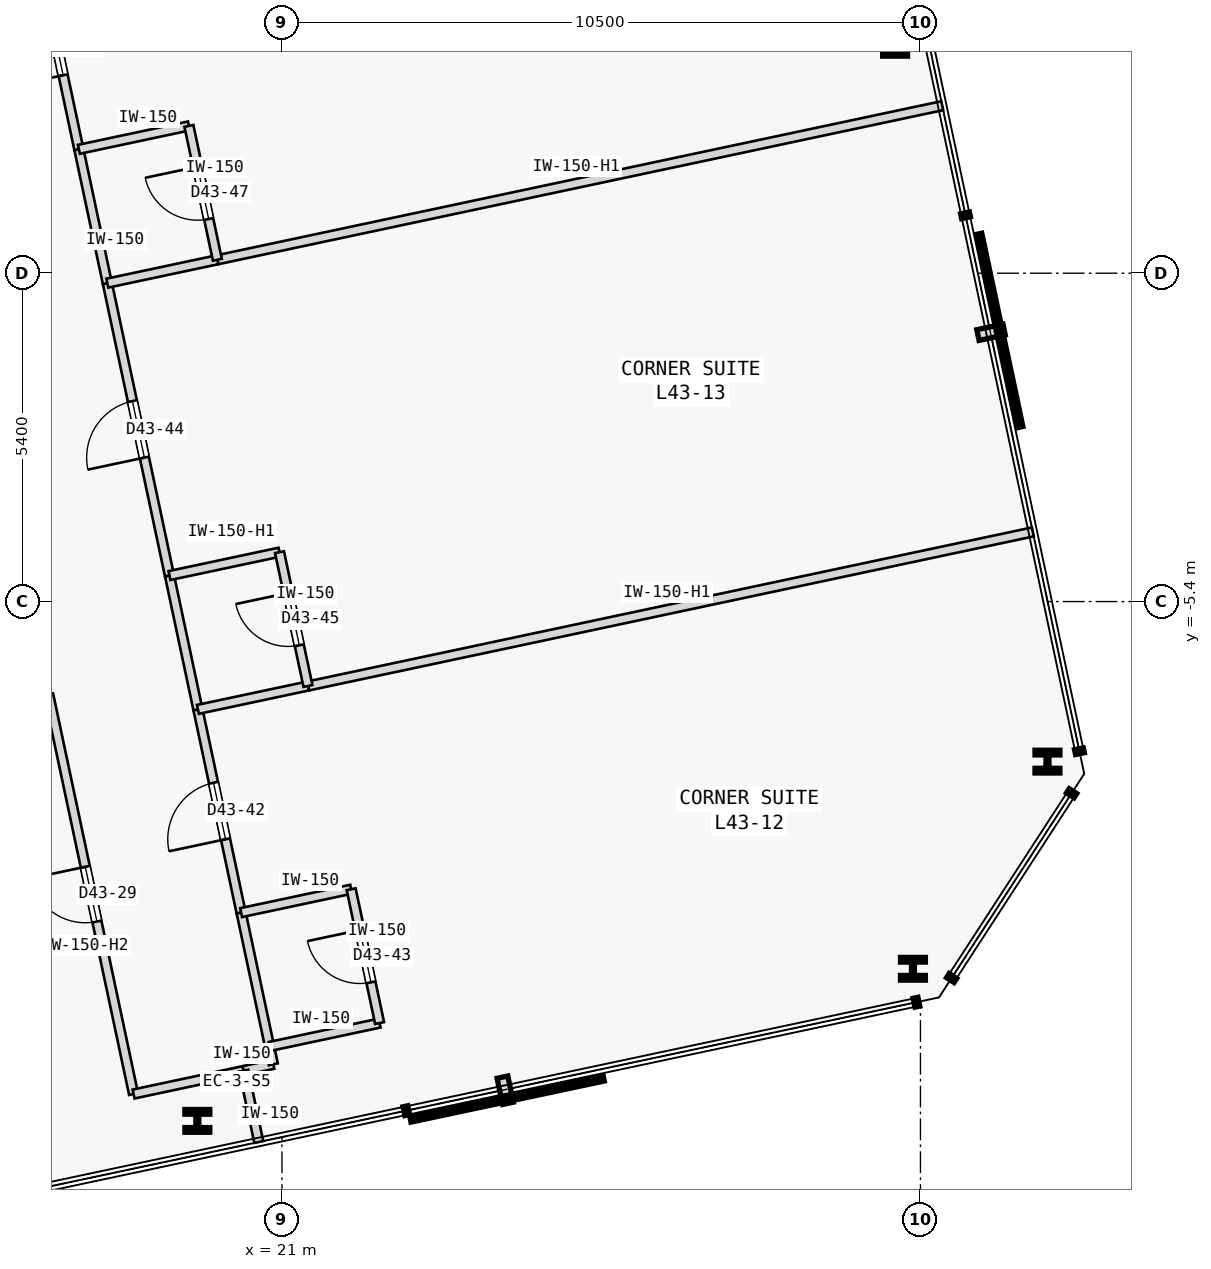
"""IFC4 building model, lengths in metres.
Left out: names, types, materials, properties, quantities, classifications, styles, units other than length and angle.
Written with IfcOpenShell. Run it as: python <this file> out.ifc"""

import sys

from ifc_helpers import new_model, si_unit, direction, frame, frame_2d, origin, origin_2d, place, context, subcontext, project, spatial, rectangle, i_section, extrude, element, fill, save


model = new_model("IFC4")
c1 = context("Model", 3, precision=1e-05, world=origin(), true_north=direction((0.0, 1.0)))
c2 = subcontext(c1, "Body", "Model", "MODEL_VIEW")
j1 = project(units=[si_unit("LENGTHUNIT", "METRE"), si_unit("PLANEANGLEUNIT", "RADIAN")], contexts=[c1])
p1 = place(None, origin())
s1 = spatial("IfcSite", under=j1, at=p1, CompositionType="ELEMENT")
p2 = place(p1, origin())
s2 = spatial("IfcBuilding", under=s1, at=p2, CompositionType="ELEMENT")
p3 = place(p2, frame((0.0, 0.0, 168.4)))
s3 = spatial("IfcBuildingStorey", under=s2, at=p3, CompositionType="ELEMENT", Elevation=168.4)
for number, where, z_axis, x_axis in (
    (1, (19.608, -13.94, 0.0), (0.0, 0.0, 1.0), (1.0, 0.0, 0.0)),
    (2, (31.376, -11.439, 0.0), (0.0, 0.0, 1.0), (1.0, 0.0, 0.0)),
    (3, (33.589, -8.032, 0.0), (0.0, 0.0, 1.0), (1.0, 0.0, 0.0)),
    (4, (31.083, 3.756, 0.0), (0.0, 0.0, 1.0), (1.0, 0.0, 0.0)),
):
    element("IfcColumn", number, at=place(p3, frame(where, z_axis=z_axis, x_axis=x_axis)), inside=s3, PredefinedType="COLUMN", context=c2, shape_type="SweptSolid", body=[
        extrude(i_section(OverallWidth=0.409, OverallDepth=0.374, WebThickness=0.048, FlangeThickness=0.077, FilletRadius=0.015, at=origin_2d()), origin(), (0.0, 0.0, 1.0), 3.4),
    ])
p4 = place(p3, frame((18.56, -13.498, 0.0), z_axis=(0.0, 0.0, 1.0), x_axis=(-0.207888737749, 0.978152479278, 0.0)))
e5 = element("IfcWall", 5, at=p4, inside=s3, PredefinedType="PARTITIONING", context=c2, shape_type="SweptSolid", body=[
    extrude(rectangle(XDim=6.72, YDim=0.15, at=frame_2d((3.36, 0.0))), origin(), (0.0, 0.0, 1.0), 2.575),
])
p5 = place(p4, frame((2.9, 0.0, 0.0)))
e6 = element("IfcOpeningElement", 6, at=p5, cuts=e5, PredefinedType="OPENING", context=c2, shape_type="SweptSolid", body=[
    extrude(rectangle(XDim=0.92, YDim=2.15, at=frame_2d((0.46, 1.075))), frame((0.0, 0.085, 0.0), z_axis=(0.0, -1.0, 0.0), x_axis=(1.0, 0.0, 0.0)), (0.0, 0.0, 1.0), 0.17),
])
p6 = place(p3, frame((18.56, -13.498, 0.0), z_axis=(0.0, 0.0, 1.0), x_axis=(0.978160192495, 0.207852442415, 0.0)))
e7 = element("IfcWall", 7, at=p6, inside=s3, PredefinedType="PARTITIONING", context=c2, shape_type="SweptSolid", body=[
    extrude(rectangle(XDim=1.85, YDim=0.15, at=frame_2d((0.925, 0.0))), origin(), (0.0, 0.0, 1.0), 3.175),
])
p7 = place(p3, frame((20.369, -13.114, 0.0), z_axis=(0.0, 0.0, 1.0), x_axis=(0.978143962546, 0.207928806409, 0.0)))
e8 = element("IfcWall", 8, at=p7, inside=s3, PredefinedType="PARTITIONING", context=c2, shape_type="SweptSolid", body=[
    extrude(rectangle(XDim=0.5, YDim=0.15, at=frame_2d((0.25, 0.0))), origin(), (0.0, 0.0, 1.0), 3.175),
])
p8 = place(p3, frame((20.858, -13.01, 0.0), z_axis=(0.0, 0.0, 1.0), x_axis=(-0.208306395052, 0.978063620518, 0.0)))
e9 = element("IfcWall", 9, at=p8, inside=s3, PredefinedType="PARTITIONING", context=c2, shape_type="SweptSolid", body=[
    extrude(rectangle(XDim=0.3, YDim=0.15, at=frame_2d((0.15, 0.0))), origin(), (0.0, 0.0, 1.0), 3.175),
])
p9 = place(p3, frame((20.328, -10.515, 0.0), z_axis=(0.0, 0.0, 1.0), x_axis=(-0.207918572776, 0.978146137903, 0.0)))
e10 = element("IfcWall", 10, at=p9, inside=s3, PredefinedType="PARTITIONING", context=c2, shape_type="SweptSolid", body=[
    extrude(rectangle(XDim=3.417, YDim=0.15, at=frame_2d((1.708, 0.0))), origin(), (0.0, 0.0, 1.0), 3.175),
])
p10 = place(p9, frame((1.233, 0.0, 0.0)))
e11 = element("IfcOpeningElement", 11, at=p10, cuts=e10, PredefinedType="OPENING", context=c2, shape_type="SweptSolid", body=[
    extrude(rectangle(XDim=0.95, YDim=2.15, at=frame_2d((0.475, 1.075))), frame((0.0, 0.085, 0.0), z_axis=(0.0, -1.0, 0.0), x_axis=(1.0, 0.0, 0.0)), (0.0, 0.0, 1.0), 0.17),
])
p11 = place(p3, frame((20.796, -12.716, 0.0), z_axis=(0.0, 0.0, 1.0), x_axis=(-0.207891197838, 0.978151956427, 0.0)))
e12 = element("IfcWall", 12, at=p11, inside=s3, PredefinedType="PARTITIONING", context=c2, shape_type="SweptSolid", body=[
    extrude(rectangle(XDim=2.25, YDim=0.15, at=frame_2d((1.125, 0.0))), origin(), (0.0, 0.0, 1.0), 3.175),
])
p12 = place(p3, frame((19.15, -4.972, 0.0), z_axis=(0.0, 0.0, 1.0), x_axis=(-0.207934781332, 0.978142692409, 0.0)))
e13 = element("IfcWall", 13, at=p12, inside=s3, PredefinedType="PARTITIONING", context=c2, shape_type="SweptSolid", body=[
    extrude(rectangle(XDim=4.916, YDim=0.15, at=frame_2d((2.458, 0.0))), origin(), (0.0, 0.0, 1.0), 3.175),
])
p13 = place(p12, frame((1.983, 0.0, 0.0)))
e14 = element("IfcOpeningElement", 14, at=p13, cuts=e13, PredefinedType="OPENING", context=c2, shape_type="SweptSolid", body=[
    extrude(rectangle(XDim=0.95, YDim=2.15, at=frame_2d((0.475, 1.075))), frame((0.0, 0.085, 0.0), z_axis=(0.0, -1.0, 0.0), x_axis=(1.0, 0.0, 0.0)), (0.0, 0.0, 1.0), 0.17),
])
p14 = place(p3, frame((19.618, -7.173, 0.0), z_axis=(0.0, 0.0, 1.0), x_axis=(-0.207913264065, 0.978147266328, 0.0)))
e15 = element("IfcWall", 15, at=p14, inside=s3, PredefinedType="PARTITIONING", context=c2, shape_type="SweptSolid", body=[
    extrude(rectangle(XDim=2.25, YDim=0.15, at=frame_2d((1.125, 0.0))), origin(), (0.0, 0.0, 1.0), 3.175),
])
p15 = place(p3, frame((17.66, 2.037, 0.0), z_axis=(0.0, 0.0, 1.0), x_axis=(-0.207894386012, 0.978151278824, 0.0)))
e16 = element("IfcWall", 16, at=p15, inside=s3, PredefinedType="PARTITIONING", context=c2, shape_type="SweptSolid", body=[
    extrude(rectangle(XDim=4.917, YDim=0.15, at=frame_2d((2.458, 0.0))), origin(), (0.0, 0.0, 1.0), 3.175),
])
p16 = place(p15, frame((1.246, 0.0, 0.0)))
e17 = element("IfcOpeningElement", 17, at=p16, cuts=e16, PredefinedType="OPENING", context=c2, shape_type="SweptSolid", body=[
    extrude(rectangle(XDim=0.95, YDim=2.15, at=frame_2d((0.475, 1.075))), frame((0.0, 0.085, 0.0), z_axis=(0.0, -1.0, 0.0), x_axis=(1.0, 0.0, 0.0)), (0.0, 0.0, 1.0), 0.17),
])
p17 = place(p3, frame((18.128, -0.164, 0.0), z_axis=(0.0, 0.0, 1.0), x_axis=(-0.207891197838, 0.978151956427, 0.0)))
e18 = element("IfcWall", 18, at=p17, inside=s3, PredefinedType="PARTITIONING", context=c2, shape_type="SweptSolid", body=[
    extrude(rectangle(XDim=2.25, YDim=0.15, at=frame_2d((1.125, 0.0))), origin(), (0.0, 0.0, 1.0), 3.175),
])
p18 = place(p3, frame((20.619, -14.288, 0.0), z_axis=(0.0, 0.0, 1.0), x_axis=(-0.207917150959, 0.978146440129, 0.0)))
e19 = element("IfcWall", 19, at=p18, inside=s3, PredefinedType="PARTITIONING", context=c2, shape_type="SweptSolid", body=[
    extrude(rectangle(XDim=1.2, YDim=0.15, at=frame_2d((0.6, 0.0))), origin(), (0.0, 0.0, 1.0), 3.175),
])
for number, where, z_axis, x_axis in (
    (20, (20.796, -12.716, 0.0), (0.0, 0.0, 1.0), (0.978, 0.208, 0.0)),
    (21, (20.328, -10.515, 0.0), (0.0, 0.0, 1.0), (0.978, 0.208, 0.0)),
):
    element("IfcWall", number, at=place(p3, frame(where, z_axis=z_axis, x_axis=x_axis)), inside=s3, PredefinedType="PARTITIONING", context=c2, shape_type="SweptSolid", body=[
        extrude(rectangle(XDim=1.85, YDim=0.15, at=frame_2d((0.925, 0.0))), origin(), (0.0, 0.0, 1.0), 3.175),
    ])
p19 = place(p3, frame((22.605, -12.332, 0.0), z_axis=(0.0, 0.0, 1.0), x_axis=(-0.207891197838, 0.978151956427, 0.0)))
e22 = element("IfcWall", 22, at=p19, inside=s3, PredefinedType="PARTITIONING", context=c2, shape_type="SweptSolid", body=[
    extrude(rectangle(XDim=2.25, YDim=0.15, at=frame_2d((1.125, 0.0))), origin(), (0.0, 0.0, 1.0), 3.175),
])
p20 = place(p19, frame((0.685, 0.0, 0.0)))
e23 = element("IfcOpeningElement", 23, at=p20, cuts=e22, PredefinedType="OPENING", context=c2, shape_type="SweptSolid", body=[
    extrude(rectangle(XDim=0.88, YDim=2.15, at=frame_2d((0.44, 1.075))), frame((0.0, 0.085, 0.0), z_axis=(0.0, -1.0, 0.0), x_axis=(1.0, 0.0, 0.0)), (0.0, 0.0, 1.0), 0.17),
])
p21 = place(p3, frame((21.427, -6.789, 0.0), z_axis=(0.0, 0.0, 1.0), x_axis=(0.97814556055, 0.207921288896, 0.0)))
e24 = element("IfcWall", 24, at=p21, inside=s3, PredefinedType="PARTITIONING", context=c2, shape_type="SweptSolid", body=[
    extrude(rectangle(XDim=12.187, YDim=0.15, at=frame_2d((6.094, 0.0))), origin(), (0.0, 0.0, 1.0), 2.725),
])
p22 = place(p3, frame((19.618, -7.173, 0.0), z_axis=(0.0, 0.0, 1.0), x_axis=(0.978160192495, 0.207852442415, 0.0)))
e25 = element("IfcWall", 25, at=p22, inside=s3, PredefinedType="PARTITIONING", context=c2, shape_type="SweptSolid", body=[
    extrude(rectangle(XDim=1.85, YDim=0.15, at=frame_2d((0.925, 0.0))), origin(), (0.0, 0.0, 1.0), 3.175),
])
p23 = place(p3, frame((19.15, -4.972, 0.0), z_axis=(0.0, 0.0, 1.0), x_axis=(0.978133353907, 0.20797870558, 0.0)))
e26 = element("IfcWall", 26, at=p23, inside=s3, PredefinedType="PARTITIONING", context=c2, shape_type="SweptSolid", body=[
    extrude(rectangle(XDim=1.85, YDim=0.15, at=frame_2d((0.925, 0.0))), origin(), (0.0, 0.0, 1.0), 2.725),
])
p24 = place(p3, frame((21.427, -6.789, 0.0), z_axis=(0.0, 0.0, 1.0), x_axis=(-0.207891197838, 0.978151956427, 0.0)))
e27 = element("IfcWall", 27, at=p24, inside=s3, PredefinedType="PARTITIONING", context=c2, shape_type="SweptSolid", body=[
    extrude(rectangle(XDim=2.25, YDim=0.15, at=frame_2d((1.125, 0.0))), origin(), (0.0, 0.0, 1.0), 3.175),
])
p25 = place(p24, frame((0.685, 0.0, 0.0)))
e28 = element("IfcOpeningElement", 28, at=p25, cuts=e27, PredefinedType="OPENING", context=c2, shape_type="SweptSolid", body=[
    extrude(rectangle(XDim=0.88, YDim=2.15, at=frame_2d((0.44, 1.075))), frame((0.0, 0.085, 0.0), z_axis=(0.0, -1.0, 0.0), x_axis=(1.0, 0.0, 0.0)), (0.0, 0.0, 1.0), 0.17),
])
p26 = place(p3, frame((19.938, 0.221, 0.0), z_axis=(0.0, 0.0, 1.0), x_axis=(0.978144694478, 0.207925363208, 0.0)))
e29 = element("IfcWall", 29, at=p26, inside=s3, PredefinedType="PARTITIONING", context=c2, shape_type="SweptSolid", body=[
    extrude(rectangle(XDim=12.187, YDim=0.15, at=frame_2d((6.093, 0.0))), origin(), (0.0, 0.0, 1.0), 2.725),
])
p27 = place(p3, frame((18.128, -0.164, 0.0), z_axis=(0.0, 0.0, 1.0), x_axis=(0.978165892835, 0.207825614625, 0.0)))
e30 = element("IfcWall", 30, at=p27, inside=s3, PredefinedType="PARTITIONING", context=c2, shape_type="SweptSolid", body=[
    extrude(rectangle(XDim=1.85, YDim=0.15, at=frame_2d((0.925, 0.0))), origin(), (0.0, 0.0, 1.0), 3.175),
])
p28 = place(p3, frame((17.66, 2.037, 0.0), z_axis=(0.0, 0.0, 1.0), x_axis=(0.978160192495, 0.207852442415, 0.0)))
e31 = element("IfcWall", 31, at=p28, inside=s3, PredefinedType="PARTITIONING", context=c2, shape_type="SweptSolid", body=[
    extrude(rectangle(XDim=1.85, YDim=0.15, at=frame_2d((0.925, 0.0))), origin(), (0.0, 0.0, 1.0), 3.175),
])
p29 = place(p3, frame((19.938, 0.221, 0.0), z_axis=(0.0, 0.0, 1.0), x_axis=(-0.207995007687, 0.978129887478, 0.0)))
e32 = element("IfcWall", 32, at=p29, inside=s3, PredefinedType="PARTITIONING", context=c2, shape_type="SweptSolid", body=[
    extrude(rectangle(XDim=2.25, YDim=0.15, at=frame_2d((1.125, 0.0))), origin(), (0.0, 0.0, 1.0), 3.175),
])
p30 = place(p29, frame((0.685, 0.0, 0.0)))
e33 = element("IfcOpeningElement", 33, at=p30, cuts=e32, PredefinedType="OPENING", context=c2, shape_type="SweptSolid", body=[
    extrude(rectangle(XDim=0.88, YDim=2.15, at=frame_2d((0.44, 1.075))), frame((0.0, 0.085, 0.0), z_axis=(0.0, -1.0, 0.0), x_axis=(1.0, 0.0, 0.0)), (0.0, 0.0, 1.0), 0.17),
])
p31 = place(p5, origin())
e34 = element("IfcDoor", 34, at=p31, inside=s3, OperationType="SINGLE_SWING_RIGHT", PredefinedType="DOOR", context=c2, shape_type="SweptSolid", body=[
    extrude(rectangle(XDim=0.92, YDim=2.15, at=frame_2d((0.46, 1.075))), frame((0.0, 0.025, 0.0), z_axis=(0.0, -1.0, 0.0), x_axis=(1.0, 0.0, 0.0)), (0.0, 0.0, 1.0), 0.05),
])
fill(e6, e34)
p32 = place(p10, origin())
e35 = element("IfcDoor", 35, at=p32, inside=s3, OperationType="SINGLE_SWING_LEFT", PredefinedType="DOOR", context=c2, shape_type="SweptSolid", body=[
    extrude(rectangle(XDim=0.95, YDim=2.15, at=frame_2d((0.475, 1.075))), frame((0.0, 0.025, 0.0), z_axis=(0.0, -1.0, 0.0), x_axis=(1.0, 0.0, 0.0)), (0.0, 0.0, 1.0), 0.05),
])
fill(e11, e35)
p33 = place(p20, origin())
e36 = element("IfcDoor", 36, at=p33, inside=s3, OperationType="SINGLE_SWING_RIGHT", PredefinedType="DOOR", context=c2, shape_type="SweptSolid", body=[
    extrude(rectangle(XDim=0.88, YDim=2.15, at=frame_2d((0.44, 1.075))), frame((0.0, 0.025, 0.0), z_axis=(0.0, -1.0, 0.0), x_axis=(1.0, 0.0, 0.0)), (0.0, 0.0, 1.0), 0.05),
])
fill(e23, e36)
p34 = place(p13, origin())
e37 = element("IfcDoor", 37, at=p34, inside=s3, OperationType="SINGLE_SWING_LEFT", PredefinedType="DOOR", context=c2, shape_type="SweptSolid", body=[
    extrude(rectangle(XDim=0.95, YDim=2.15, at=frame_2d((0.475, 1.075))), frame((0.0, 0.025, 0.0), z_axis=(0.0, -1.0, 0.0), x_axis=(1.0, 0.0, 0.0)), (0.0, 0.0, 1.0), 0.05),
])
fill(e14, e37)
p35 = place(p25, origin())
e38 = element("IfcDoor", 38, at=p35, inside=s3, OperationType="SINGLE_SWING_RIGHT", PredefinedType="DOOR", context=c2, shape_type="SweptSolid", body=[
    extrude(rectangle(XDim=0.88, YDim=2.15, at=frame_2d((0.44, 1.075))), frame((0.0, 0.025, 0.0), z_axis=(0.0, -1.0, 0.0), x_axis=(1.0, 0.0, 0.0)), (0.0, 0.0, 1.0), 0.05),
])
fill(e28, e38)
p36 = place(p16, origin())
e39 = element("IfcDoor", 39, at=p36, inside=s3, OperationType="SINGLE_SWING_LEFT", PredefinedType="DOOR", context=c2, shape_type="SweptSolid", body=[
    extrude(rectangle(XDim=0.95, YDim=2.15, at=frame_2d((0.475, 1.075))), frame((0.0, 0.025, 0.0), z_axis=(0.0, -1.0, 0.0), x_axis=(1.0, 0.0, 0.0)), (0.0, 0.0, 1.0), 0.05),
])
fill(e17, e39)
p37 = place(p30, origin())
e40 = element("IfcDoor", 40, at=p37, inside=s3, OperationType="SINGLE_SWING_RIGHT", PredefinedType="DOOR", context=c2, shape_type="SweptSolid", body=[
    extrude(rectangle(XDim=0.88, YDim=2.15, at=frame_2d((0.44, 1.075))), frame((0.0, 0.025, 0.0), z_axis=(0.0, -1.0, 0.0), x_axis=(1.0, 0.0, 0.0)), (0.0, 0.0, 1.0), 0.05),
])
fill(e33, e40)
save(model, sys.argv[1])
